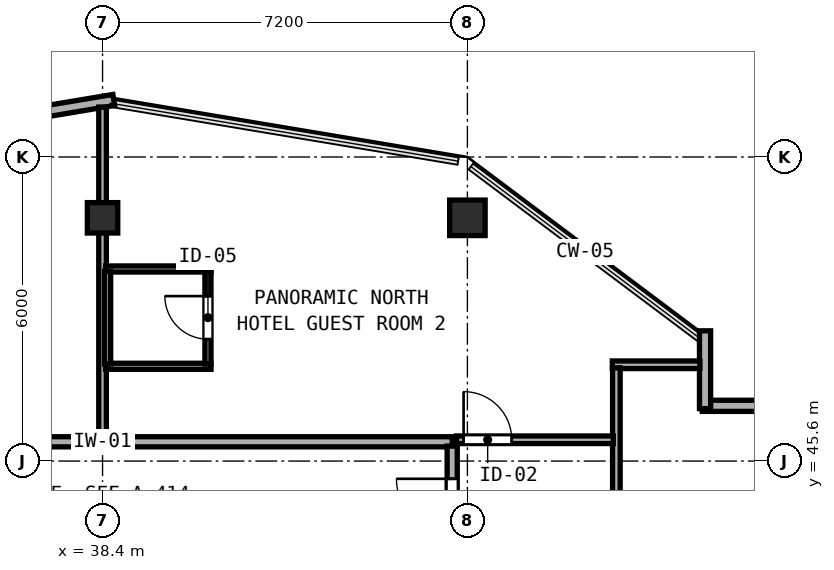
"""IFC4 building model, lengths in metres.
Left out: names, types, materials, properties, quantities, classifications, styles, units other than length and angle.
Written with IfcOpenShell. Run it as: python <this file> out.ifc"""

import sys

from ifc_helpers import new_model, si_unit, direction, frame, frame_2d, origin, origin_2d, place, context, subcontext, project, spatial, rectangle, hollow_rectangle, extrude, element, fill, save


model = new_model("IFC4")
c1 = context("Model", 3, precision=1e-05, world=origin(), true_north=direction((0.0, 1.0)))
c2 = subcontext(c1, "Body", "Model", "MODEL_VIEW")
j1 = project(units=[si_unit("LENGTHUNIT", "METRE"), si_unit("PLANEANGLEUNIT", "RADIAN")], contexts=[c1])
p1 = place(None, origin())
s1 = spatial("IfcSite", under=j1, at=p1, CompositionType="ELEMENT")
p2 = place(p1, origin())
s2 = spatial("IfcBuilding", under=s1, at=p2, CompositionType="ELEMENT")
p3 = place(p2, frame((0.0, 0.0, 282.2)))
s3 = spatial("IfcBuildingStorey", under=s2, at=p3, CompositionType="ELEMENT", Elevation=282.2)
p4 = place(p3, frame((45.6, 50.4, 0.0), z_axis=(0.0, 0.0, 1.0), x_axis=(1.0, 0.0, 0.0)))
e1 = element("IfcColumn", 1, at=p4, inside=s3, PredefinedType="COLUMN", context=c2, shape_type="SweptSolid", body=[
    extrude(hollow_rectangle(XDim=0.7, YDim=0.7, WallThickness=0.026, at=origin_2d()), origin(), (0.0, 0.0, 1.0), 3.9),
])
p5 = place(p3, frame((38.4, 50.4, 0.0), z_axis=(0.0, 0.0, 1.0), x_axis=(1.0, 0.0, 0.0)))
e2 = element("IfcColumn", 2, at=p5, inside=s3, PredefinedType="COLUMN", context=c2, shape_type="SweptSolid", body=[
    extrude(hollow_rectangle(XDim=0.6, YDim=0.6, WallThickness=0.024, at=origin_2d()), origin(), (0.0, 0.0, 1.0), 3.9),
])
p6 = place(p3, frame((51.545, 46.69, 0.0), z_axis=(0.0, 0.0, 1.0), x_axis=(-1.0, 0.0, 0.0)))
e3 = element("IfcWall", 3, at=p6, inside=s3, PredefinedType="SOLIDWALL", context=c2, shape_type="SweptSolid", body=[
    extrude(rectangle(XDim=1.31, YDim=0.22, at=frame_2d((0.655, 0.0))), origin(), (0.0, 0.0, 1.0), 3.72),
])
p7 = place(p3, frame((50.29, 46.635, 0.0), z_axis=(0.0, 0.0, 1.0), x_axis=(0.0, 1.0, 0.0)))
e4 = element("IfcWall", 4, at=p7, inside=s3, PredefinedType="SOLIDWALL", context=c2, shape_type="SweptSolid", body=[
    extrude(rectangle(XDim=1.535, YDim=0.22, at=frame_2d((0.768, 0.0))), origin(), (0.0, 0.0, 1.0), 3.72),
])
p8 = place(p3, frame((38.622, 52.726, 0.0), z_axis=(0.0, 0.0, 1.0), x_axis=(-0.986390420428, -0.164420006349, 0.0)))
e5 = element("IfcWall", 5, at=p8, inside=s3, PredefinedType="SOLIDWALL", context=c2, shape_type="SweptSolid", body=[
    extrude(rectangle(XDim=7.534, YDim=0.22, at=frame_2d((3.767, 0.0))), origin(), (0.0, 0.0, 1.0), 3.72),
])
p9 = place(p8, frame((1.6, 0.0, 0.85)))
e6 = element("IfcOpeningElement", 6, at=p9, cuts=e5, PredefinedType="OPENING", context=c2, shape_type="SweptSolid", body=[
    extrude(rectangle(XDim=1.25, YDim=1.95, at=frame_2d((0.625, 0.975))), frame((0.0, 0.12, 0.0), z_axis=(0.0, -1.0, 0.0), x_axis=(1.0, 0.0, 0.0)), (0.0, 0.0, 1.0), 0.24),
])
p10 = place(p3, frame((31.5, 45.98, 0.0), z_axis=(0.0, 0.0, 1.0), x_axis=(1.0, 0.0, 0.0)))
e7 = element("IfcWall", 7, at=p10, inside=s3, PredefinedType="SOLIDWALL", context=c2, shape_type="SweptSolid", body=[
    extrude(rectangle(XDim=13.8, YDim=0.2, at=frame_2d((6.9, 0.0))), origin(), (0.0, 0.0, 1.0), 3.72),
])
p11 = place(p3, frame((45.3, 43.45, 0.0), z_axis=(0.0, 0.0, 1.0), x_axis=(0.0, 1.0, 0.0)))
e8 = element("IfcWall", 8, at=p11, inside=s3, PredefinedType="SOLIDWALL", context=c2, shape_type="SweptSolid", body=[
    extrude(rectangle(XDim=2.445, YDim=0.2, at=frame_2d((1.223, 0.0))), origin(), (0.0, 0.0, 1.0), 3.72),
])
p12 = place(p11, frame((0.7, 0.0, 0.0)))
e9 = element("IfcOpeningElement", 9, at=p12, cuts=e8, PredefinedType="OPENING", context=c2, shape_type="SweptSolid", body=[
    extrude(rectangle(XDim=1.1, YDim=2.15, at=frame_2d((0.55, 1.075))), frame((0.0, 0.11, 0.0), z_axis=(0.0, -1.0, 0.0), x_axis=(1.0, 0.0, 0.0)), (0.0, 0.0, 1.0), 0.22),
])
p13 = place(p3, frame((48.46, 47.5, 0.0), z_axis=(0.0, 0.0, 1.0), x_axis=(1.0, 0.0, 0.0)))
e10 = element("IfcWall", 10, at=p13, inside=s3, PredefinedType="PARTITIONING", context=c2, shape_type="SweptSolid", body=[
    extrude(rectangle(XDim=1.728, YDim=0.15, at=frame_2d((0.864, 0.0))), origin(), (0.0, 0.0, 1.0), 3.72),
])
p14 = place(p3, frame((48.54, 39.42, 0.0), z_axis=(0.0, 0.0, 1.0), x_axis=(0.0, 1.0, 0.0)))
e11 = element("IfcWall", 11, at=p14, inside=s3, PredefinedType="PARTITIONING", context=c2, shape_type="SweptSolid", body=[
    extrude(rectangle(XDim=8.02, YDim=0.15, at=frame_2d((4.01, 0.0))), origin(), (0.0, 0.0, 1.0), 3.72),
])
p15 = place(p14, frame((1.86, 0.0, 0.0)))
e12 = element("IfcOpeningElement", 12, at=p15, cuts=e11, PredefinedType="OPENING", context=c2, shape_type="SweptSolid", body=[
    extrude(rectangle(XDim=0.95, YDim=2.12, at=frame_2d((0.475, 1.06))), frame((0.0, 0.085, 0.0), z_axis=(0.0, -1.0, 0.0), x_axis=(1.0, 0.0, 0.0)), (0.0, 0.0, 1.0), 0.17),
])
p16 = place(p3, frame((38.4, 46.065, 0.0), z_axis=(0.0, 0.0, 1.0), x_axis=(0.0, 1.0, 0.0)))
e13 = element("IfcWall", 13, at=p16, inside=s3, PredefinedType="PARTITIONING", context=c2, shape_type="SweptSolid", body=[
    extrude(rectangle(XDim=6.52, YDim=0.15, at=frame_2d((3.26, 0.0))), origin(), (0.0, 0.0, 1.0), 3.72),
])
p17 = place(p3, frame((45.385, 46.02, 0.0), z_axis=(0.0, 0.0, 1.0), x_axis=(1.0, 0.0, 0.0)))
e14 = element("IfcWall", 14, at=p17, inside=s3, PredefinedType="PARTITIONING", context=c2, shape_type="SweptSolid", body=[
    extrude(rectangle(XDim=3.095, YDim=0.15, at=frame_2d((1.547, 0.0))), origin(), (0.0, 0.0, 1.0), 3.72),
])
p18 = place(p17, frame((0.14, 0.0, 0.0)))
e15 = element("IfcOpeningElement", 15, at=p18, cuts=e14, PredefinedType="OPENING", context=c2, shape_type="SweptSolid", body=[
    extrude(rectangle(XDim=0.95, YDim=2.15, at=frame_2d((0.475, 1.075))), frame((0.0, 0.085, 0.0), z_axis=(0.0, -1.0, 0.0), x_axis=(1.0, 0.0, 0.0)), (0.0, 0.0, 1.0), 0.17),
])
for number, where, z_axis, x_axis in (
    (16, (38.46, 49.39, 0.0), (0.0, 0.0, 1.0), (1.0, 0.0, 0.0)),
    (17, (38.46, 47.47, 0.0), (0.0, 0.0, 1.0), (1.0, 0.0, 0.0)),
):
    element("IfcWall", number, at=place(p3, frame(where, z_axis=z_axis, x_axis=x_axis)), inside=s3, PredefinedType="PARTITIONING", context=c2, shape_type="SweptSolid", body=[
        extrude(rectangle(XDim=2.08, YDim=0.12, at=frame_2d((1.04, 0.0))), origin(), (0.0, 0.0, 1.0), 3.72),
    ])
p19 = place(p3, frame((38.5, 47.515, 0.0), z_axis=(0.0, 0.0, 1.0), x_axis=(0.0, 1.0, 0.0)))
e18 = element("IfcWall", 18, at=p19, inside=s3, PredefinedType="PARTITIONING", context=c2, shape_type="SweptSolid", body=[
    extrude(rectangle(XDim=1.83, YDim=0.12, at=frame_2d((0.915, 0.0))), origin(), (0.0, 0.0, 1.0), 3.72),
])
p20 = place(p3, frame((40.48, 47.515, 0.0), z_axis=(0.0, 0.0, 1.0), x_axis=(0.0, 1.0, 0.0)))
e19 = element("IfcWall", 19, at=p20, inside=s3, PredefinedType="PARTITIONING", context=c2, shape_type="SweptSolid", body=[
    extrude(rectangle(XDim=1.83, YDim=0.12, at=frame_2d((0.915, 0.0))), origin(), (0.0, 0.0, 1.0), 3.72),
])
p21 = place(p20, frame((0.49, 0.0, 0.0)))
e20 = element("IfcOpeningElement", 20, at=p21, cuts=e19, PredefinedType="OPENING", context=c2, shape_type="SweptSolid", body=[
    extrude(rectangle(XDim=0.85, YDim=2.1, at=frame_2d((0.425, 1.05))), frame((0.0, 0.07, 0.0), z_axis=(0.0, -1.0, 0.0), x_axis=(1.0, 0.0, 0.0)), (0.0, 0.0, 1.0), 0.14),
])
p22 = place(p12, origin())
e21 = element("IfcDoor", 21, at=p22, inside=s3, OperationType="SINGLE_SWING_RIGHT", PredefinedType="DOOR", context=c2, shape_type="SweptSolid", body=[
    extrude(rectangle(XDim=1.1, YDim=2.15, at=frame_2d((0.55, 1.075))), frame((0.0, 0.025, 0.0), z_axis=(0.0, -1.0, 0.0), x_axis=(1.0, 0.0, 0.0)), (0.0, 0.0, 1.0), 0.05),
])
fill(e9, e21)
p23 = place(p18, origin())
e22 = element("IfcDoor", 22, at=p23, inside=s3, OperationType="SINGLE_SWING_LEFT", PredefinedType="DOOR", context=c2, shape_type="SweptSolid", body=[
    extrude(rectangle(XDim=0.95, YDim=2.15, at=frame_2d((0.475, 1.075))), frame((0.0, 0.025, 0.0), z_axis=(0.0, -1.0, 0.0), x_axis=(1.0, 0.0, 0.0)), (0.0, 0.0, 1.0), 0.05),
])
fill(e15, e22)
p24 = place(p21, origin())
e23 = element("IfcDoor", 23, at=p24, inside=s3, OperationType="SINGLE_SWING_RIGHT", PredefinedType="DOOR", context=c2, shape_type="SweptSolid", body=[
    extrude(rectangle(XDim=0.85, YDim=2.1, at=frame_2d((0.425, 1.05))), frame((0.0, 0.025, 0.0), z_axis=(0.0, -1.0, 0.0), x_axis=(1.0, 0.0, 0.0)), (0.0, 0.0, 1.0), 0.05),
])
fill(e20, e23)
save(model, sys.argv[1])
